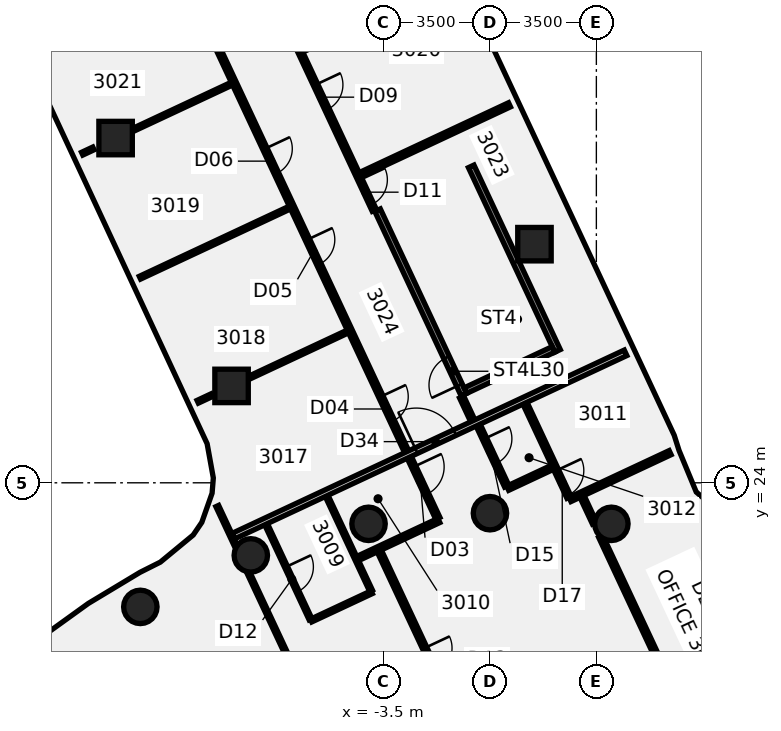
"""IFC4 building model, lengths in metres.
Left out: names, types, materials, properties, quantities, classifications, styles, units other than length and angle.
Written with IfcOpenShell. Run it as: python <this file> out.ifc"""

import sys

from ifc_helpers import new_model, si_unit, direction, frame, frame_2d, origin, origin_2d, place, context, subcontext, project, spatial, polyline, rectangle, circle, outline, extrude, element, fill, save


model = new_model("IFC4")
c1 = context("Model", 3, precision=1e-05, world=origin(), true_north=direction((0.0, 1.0)))
c2 = subcontext(c1, "Body", "Model", "MODEL_VIEW")
j1 = project(units=[si_unit("LENGTHUNIT", "METRE"), si_unit("PLANEANGLEUNIT", "RADIAN")], contexts=[c1])
p1 = place(None, origin())
s1 = spatial("IfcSite", under=j1, at=p1, CompositionType="ELEMENT")
p2 = place(p1, origin())
s2 = spatial("IfcBuilding", under=s1, at=p2, CompositionType="ELEMENT")
p3 = place(p2, frame((0.0, 0.0, 124.75)))
s3 = spatial("IfcBuildingStorey", under=s2, at=p3, CompositionType="ELEMENT", Elevation=124.75)
for number, where, z_axis, x_axis in (
    (1, (3.994, 22.651, -0.14), (0.0, 0.0, 1.0), (1.0, 0.0, 0.0)),
    (2, (0.0, 23.0, -0.14), (0.0, 0.0, 1.0), (1.0, 0.0, 0.0)),
    (3, (-3.994, 22.651, -0.14), (0.0, 0.0, 1.0), (1.0, 0.0, 0.0)),
    (4, (-7.866, 21.613, -0.14), (0.0, 0.0, 1.0), (1.0, 0.0, 0.0)),
    (5, (-11.5, 19.919, -0.14), (0.0, 0.0, 1.0), (1.0, 0.0, 0.0)),
):
    element("IfcColumn", number, at=place(p3, frame(where, z_axis=z_axis, x_axis=x_axis)), inside=s3, PredefinedType="COLUMN", context=c2, shape_type="SweptSolid", body=[
        extrude(circle(Radius=0.55, at=origin_2d()), origin(), (0.0, 0.0, 1.0), 3.71),
    ])
p4 = place(p3, frame((-12.314, 35.338, -0.138), z_axis=(-0.064699855868, -0.060824433029, 0.9960493547), x_axis=(0.903035286049, 0.421197702581, 0.084378714676)))
e6 = element("IfcColumn", 6, at=p4, inside=s3, PredefinedType="COLUMN", context=c2, shape_type="SweptSolid", body=[
    extrude(rectangle(XDim=1.1, YDim=1.1, at=origin_2d()), origin(), (0.0, 0.0, 1.0), 3.717),
])
p5 = place(p3, frame((-8.499, 27.187, -0.139), z_axis=(-0.025080401947, -0.041932325564, 0.998805613476), x_axis=(0.905336041768, 0.422762183328, 0.040481944421)))
e7 = element("IfcColumn", 7, at=p5, inside=s3, PredefinedType="COLUMN", context=c2, shape_type="SweptSolid", body=[
    extrude(rectangle(XDim=1.1, YDim=1.1, at=origin_2d()), origin(), (0.0, 0.0, 1.0), 3.709),
])
p6 = place(p3, frame((1.464, 31.849, -0.139), z_axis=(-0.048386644022, 0.00678071338, 0.998805664084), x_axis=(0.422461295082, -0.905990074096, 0.026616532396)))
e8 = element("IfcColumn", 8, at=p6, inside=s3, PredefinedType="COLUMN", context=c2, shape_type="SweptSolid", body=[
    extrude(rectangle(XDim=1.1, YDim=1.1, at=origin_2d()), origin(), (0.0, 0.0, 1.0), 3.708),
])
p7 = place(p3, frame((-10.294, 41.169, 0.0), z_axis=(0.0, 0.0, 1.0), x_axis=(0.423769207005, -0.905770202201, 0.0)))
e9 = element("IfcWall", 9, at=p7, inside=s3, PredefinedType="PARTITIONING", context=c2, shape_type="SweptSolid", body=[
    extrude(rectangle(XDim=20.246, YDim=0.15, at=frame_2d((10.123, 0.0))), origin(), (0.0, 0.0, 1.0), 2.87),
])
p8 = place(p7, frame((18.375, 0.0, 0.0)))
e10 = element("IfcOpeningElement", 10, at=p8, cuts=e9, PredefinedType="OPENING", context=c2, shape_type="SweptSolid", body=[
    extrude(rectangle(XDim=1.0, YDim=2.1, at=frame_2d((0.5, 1.05))), frame((0.0, 0.085, 0.0), z_axis=(0.0, -1.0, 0.0), x_axis=(1.0, 0.0, 0.0)), (0.0, 0.0, 1.0), 0.17),
])
p9 = place(p7, frame((15.825, 0.0, 0.0)))
e11 = element("IfcOpeningElement", 11, at=p9, cuts=e9, PredefinedType="OPENING", context=c2, shape_type="SweptSolid", body=[
    extrude(rectangle(XDim=0.9, YDim=2.1, at=frame_2d((0.45, 1.05))), frame((0.0, 0.085, 0.0), z_axis=(0.0, -1.0, 0.0), x_axis=(1.0, 0.0, 0.0)), (0.0, 0.0, 1.0), 0.17),
])
p10 = place(p7, frame((10.125, 0.0, 0.0)))
e12 = element("IfcOpeningElement", 12, at=p10, cuts=e9, PredefinedType="OPENING", context=c2, shape_type="SweptSolid", body=[
    extrude(rectangle(XDim=0.9, YDim=2.1, at=frame_2d((0.45, 1.05))), frame((0.0, 0.085, 0.0), z_axis=(0.0, -1.0, 0.0), x_axis=(1.0, 0.0, 0.0)), (0.0, 0.0, 1.0), 0.17),
])
p11 = place(p7, frame((6.825, 0.0, 0.0)))
e13 = element("IfcOpeningElement", 13, at=p11, cuts=e9, PredefinedType="OPENING", context=c2, shape_type="SweptSolid", body=[
    extrude(rectangle(XDim=0.9, YDim=2.1, at=frame_2d((0.45, 1.05))), frame((0.0, 0.085, 0.0), z_axis=(0.0, -1.0, 0.0), x_axis=(1.0, 0.0, 0.0)), (0.0, 0.0, 1.0), 0.17),
])
p12 = place(p7, frame((2.325, 0.0, 0.0)))
e14 = element("IfcOpeningElement", 14, at=p12, cuts=e9, PredefinedType="OPENING", context=c2, shape_type="SweptSolid", body=[
    extrude(rectangle(XDim=0.9, YDim=2.1, at=frame_2d((0.45, 1.05))), frame((0.0, 0.085, 0.0), z_axis=(0.0, -1.0, 0.0), x_axis=(1.0, 0.0, 0.0)), (0.0, 0.0, 1.0), 0.17),
])
p13 = place(p3, frame((-8.969, 23.236, 0.0), z_axis=(0.0, 0.0, 1.0), x_axis=(0.423755205879, -0.905776752567, 0.0)))
e15 = element("IfcWall", 15, at=p13, inside=s3, PredefinedType="PARTITIONING", context=c2, shape_type="SweptSolid", body=[
    extrude(rectangle(XDim=1.475, YDim=0.1, at=frame_2d((0.737, 0.0))), origin(), (0.0, 0.0, 1.0), 2.97),
])
p14 = place(p3, frame((-7.96, 21.078, 0.0), z_axis=(0.0, 0.0, 1.0), x_axis=(0.423844267344, -0.905735081047, 0.0)))
e16 = element("IfcWall", 16, at=p14, inside=s3, PredefinedType="PARTITIONING", context=c2, shape_type="SweptSolid", body=[
    extrude(rectangle(XDim=10.048, YDim=0.1, at=frame_2d((5.024, 0.0))), origin(), (0.0, 0.0, 1.0), 2.97),
])
p15 = place(p3, frame((-8.12, 42.186, 0.0), z_axis=(0.0, 0.0, 1.0), x_axis=(0.423753940866, -0.905777344385, 0.0)))
e17 = element("IfcWall", 17, at=p15, inside=s3, PredefinedType="PARTITIONING", context=c2, shape_type="SweptSolid", body=[
    extrude(rectangle(XDim=10.186, YDim=0.15, at=frame_2d((5.093, 0.0))), origin(), (0.0, 0.0, 1.0), 2.87),
])
p16 = place(p15, frame((5.625, 0.0, 0.0)))
e18 = element("IfcOpeningElement", 18, at=p16, cuts=e17, PredefinedType="OPENING", context=c2, shape_type="SweptSolid", body=[
    extrude(rectangle(XDim=0.9, YDim=2.1, at=frame_2d((0.45, 1.05))), frame((0.0, 0.085, 0.0), z_axis=(0.0, -1.0, 0.0), x_axis=(1.0, 0.0, 0.0)), (0.0, 0.0, 1.0), 0.17),
])
p17 = place(p15, frame((1.275, 0.0, 0.0)))
e19 = element("IfcOpeningElement", 19, at=p17, cuts=e17, PredefinedType="OPENING", context=c2, shape_type="SweptSolid", body=[
    extrude(rectangle(XDim=0.9, YDim=2.1, at=frame_2d((0.45, 1.05))), frame((0.0, 0.085, 0.0), z_axis=(0.0, -1.0, 0.0), x_axis=(1.0, 0.0, 0.0)), (0.0, 0.0, 1.0), 0.17),
])
p18 = place(p15, frame((9.075, 0.0, 0.0)))
e20 = element("IfcOpeningElement", 20, at=p18, cuts=e17, PredefinedType="OPENING", context=c2, shape_type="SweptSolid", body=[
    extrude(rectangle(XDim=0.9, YDim=2.1, at=frame_2d((0.45, 1.05))), frame((0.0, 0.085, 0.0), z_axis=(0.0, -1.0, 0.0), x_axis=(1.0, 0.0, 0.0)), (0.0, 0.0, 1.0), 0.17),
])
p19 = place(p3, frame((-0.931, 26.82, 0.0), z_axis=(0.0, 0.0, 1.0), x_axis=(0.423786528485, -0.905762098056, 0.0)))
e21 = element("IfcWall", 21, at=p19, inside=s3, PredefinedType="PARTITIONING", context=c2, shape_type="SweptSolid", body=[
    extrude(rectangle(XDim=0.86, YDim=0.15, at=frame_2d((0.43, 0.0))), origin(), (0.0, 0.0, 1.0), 2.87),
])
p20 = place(p3, frame((-7.365, 22.638, 0.0), z_axis=(0.0, 0.0, 1.0), x_axis=(0.423671993632, -0.905815677614, 0.0)))
e22 = element("IfcWall", 22, at=p20, inside=s3, PredefinedType="PARTITIONING", context=c2, shape_type="SweptSolid", body=[
    extrude(rectangle(XDim=3.449, YDim=0.1, at=frame_2d((1.724, 0.0))), origin(), (0.0, 0.0, 1.0), 2.87),
])
p21 = place(p20, frame((1.55, 0.0, 0.0)))
e23 = element("IfcOpeningElement", 23, at=p21, cuts=e22, PredefinedType="OPENING", context=c2, shape_type="SweptSolid", body=[
    extrude(rectangle(XDim=0.9, YDim=2.1, at=frame_2d((0.45, 1.05))), frame((0.0, 0.06, 0.0), z_axis=(0.0, -1.0, 0.0), x_axis=(1.0, 0.0, 0.0)), (0.0, 0.0, 1.0), 0.12),
])
p22 = place(p3, frame((-5.371, 23.567, 0.0), z_axis=(0.0, 0.0, 1.0), x_axis=(0.423878271215, -0.90571916795, 0.0)))
e24 = element("IfcWall", 24, at=p22, inside=s3, PredefinedType="PARTITIONING", context=c2, shape_type="SweptSolid", body=[
    extrude(rectangle(XDim=3.446, YDim=0.1, at=frame_2d((1.723, 0.0))), origin(), (0.0, 0.0, 1.0), 2.87),
])
p23 = place(p3, frame((-3.641, 21.759, 0.0), z_axis=(0.0, 0.0, 1.0), x_axis=(0.423809726716, -0.905751243743, 0.0)))
e25 = element("IfcWall", 25, at=p23, inside=s3, PredefinedType="PARTITIONING", context=c2, shape_type="SweptSolid", body=[
    extrude(rectangle(XDim=10.785, YDim=0.15, at=frame_2d((5.393, 0.0))), origin(), (0.0, 0.0, 1.0), 2.97),
])
p24 = place(p23, frame((3.525, 0.0, 0.0)))
e26 = element("IfcOpeningElement", 26, at=p24, cuts=e25, PredefinedType="OPENING", context=c2, shape_type="SweptSolid", body=[
    extrude(rectangle(XDim=0.9, YDim=2.1, at=frame_2d((0.45, 1.05))), frame((0.0, 0.085, 0.0), z_axis=(0.0, -1.0, 0.0), x_axis=(1.0, 0.0, 0.0)), (0.0, 0.0, 1.0), 0.17),
])
p25 = place(p3, frame((-0.388, 25.898, 0.0), z_axis=(0.0, 0.0, 1.0), x_axis=(0.423693860777, -0.905805449498, 0.0)))
e27 = element("IfcWall", 27, at=p25, inside=s3, PredefinedType="PARTITIONING", context=c2, shape_type="SweptSolid", body=[
    extrude(rectangle(XDim=2.215, YDim=0.15, at=frame_2d((1.107, 0.0))), origin(), (0.0, 0.0, 1.0), 2.97),
])
p26 = place(p25, frame((0.495, 0.0, 0.0)))
e28 = element("IfcOpeningElement", 28, at=p26, cuts=e27, PredefinedType="OPENING", context=c2, shape_type="SweptSolid", body=[
    extrude(rectangle(XDim=0.9, YDim=2.1, at=frame_2d((0.45, 1.05))), frame((0.0, 0.085, 0.0), z_axis=(0.0, -1.0, 0.0), x_axis=(1.0, 0.0, 0.0)), (0.0, 0.0, 1.0), 0.17),
])
p27 = place(p3, frame((1.152, 26.618, 0.0), z_axis=(0.0, 0.0, 1.0), x_axis=(0.423667153788, -0.905817941311, 0.0)))
e29 = element("IfcWall", 29, at=p27, inside=s3, PredefinedType="PARTITIONING", context=c2, shape_type="SweptSolid", body=[
    extrude(rectangle(XDim=3.419, YDim=0.15, at=frame_2d((1.709, 0.0))), origin(), (0.0, 0.0, 1.0), 2.97),
])
p28 = place(p27, frame((2.444, 0.0, 0.0)))
e30 = element("IfcOpeningElement", 30, at=p28, cuts=e29, PredefinedType="OPENING", context=c2, shape_type="SweptSolid", body=[
    extrude(rectangle(XDim=0.9, YDim=2.1, at=frame_2d((0.45, 1.05))), frame((0.0, 0.085, 0.0), z_axis=(0.0, -1.0, 0.0), x_axis=(1.0, 0.0, 0.0)), (0.0, 0.0, 1.0), 0.17),
])
p29 = place(p3, frame((3.029, 23.551, 0.0), z_axis=(0.0, 0.0, 1.0), x_axis=(0.423795074158, -0.905758099671, 0.0)))
e31 = element("IfcWall", 31, at=p29, inside=s3, PredefinedType="PARTITIONING", context=c2, shape_type="SweptSolid", body=[
    extrude(rectangle(XDim=0.969, YDim=0.15, at=frame_2d((0.485, 0.0))), origin(), (0.0, 0.0, 1.0), 2.97),
])
p30 = place(p3, frame((3.644, 22.235, 0.0), z_axis=(0.0, 0.0, 1.0), x_axis=(0.423784513988, -0.905763040593, 0.0)))
e32 = element("IfcWall", 32, at=p30, inside=s3, PredefinedType="PARTITIONING", context=c2, shape_type="SweptSolid", body=[
    extrude(rectangle(XDim=11.311, YDim=0.15, at=frame_2d((5.655, 0.0))), origin(), (0.0, 0.0, 1.0), 2.97),
])
p31 = place(p30, frame((6.75, 0.0, 0.0)))
e33 = element("IfcOpeningElement", 33, at=p31, cuts=e32, PredefinedType="OPENING", context=c2, shape_type="SweptSolid", body=[
    extrude(rectangle(XDim=0.9, YDim=2.1, at=frame_2d((0.45, 1.05))), frame((0.0, 0.085, 0.0), z_axis=(0.0, -1.0, 0.0), x_axis=(1.0, 0.0, 0.0)), (0.0, 0.0, 1.0), 0.17),
])
p32 = place(p3, frame((-13.413, 34.825, 0.0), z_axis=(0.0, 0.0, 1.0), x_axis=(0.905846575119, 0.423605928127, 0.0)))
e34 = element("IfcWall", 34, at=p32, inside=s3, PredefinedType="PARTITIONING", context=c2, shape_type="SweptSolid", body=[
    extrude(rectangle(XDim=0.408, YDim=0.1, at=frame_2d((0.204, 0.0))), origin(), (0.0, 0.0, 1.0), 2.97),
])
p33 = place(p3, frame((-11.852, 35.555, 0.0), z_axis=(0.0, 0.0, 1.0), x_axis=(0.905779849786, 0.423748585511, 0.0)))
e35 = element("IfcWall", 35, at=p33, inside=s3, PredefinedType="PARTITIONING", context=c2, shape_type="SweptSolid", body=[
    extrude(rectangle(XDim=3.716, YDim=0.1, at=frame_2d((1.858, 0.0))), origin(), (0.0, 0.0, 1.0), 2.87),
])
p34 = place(p3, frame((-11.513, 30.745, 0.0), z_axis=(0.0, 0.0, 1.0), x_axis=(0.905786512013, 0.423734344438, 0.0)))
e36 = element("IfcWall", 36, at=p34, inside=s3, PredefinedType="PARTITIONING", context=c2, shape_type="SweptSolid", body=[
    extrude(rectangle(XDim=5.447, YDim=0.1, at=frame_2d((2.723, 0.0))), origin(), (0.0, 0.0, 1.0), 2.87),
])
p35 = place(p3, frame((-4.27, 34.134, 0.0), z_axis=(0.0, 0.0, 1.0), x_axis=(0.905772206223, 0.423764923553, 0.0)))
e37 = element("IfcWall", 37, at=p35, inside=s3, PredefinedType="PARTITIONING", context=c2, shape_type="SweptSolid", body=[
    extrude(rectangle(XDim=5.424, YDim=0.15, at=frame_2d((2.712, 0.0))), origin(), (0.0, 0.0, 1.0), 2.87),
])
p36 = place(p3, frame((-9.613, 26.666, 0.0), z_axis=(0.0, 0.0, 1.0), x_axis=(0.905887159872, 0.423519130121, 0.0)))
e38 = element("IfcWall", 38, at=p36, inside=s3, PredefinedType="PARTITIONING", context=c2, shape_type="SweptSolid", body=[
    extrude(rectangle(XDim=0.506, YDim=0.1, at=frame_2d((0.253, 0.0))), origin(), (0.0, 0.0, 1.0), 2.97),
])
p37 = place(p3, frame((-7.964, 27.437, 0.0), z_axis=(0.0, 0.0, 1.0), x_axis=(0.905736329332, 0.423841599809, 0.0)))
e39 = element("IfcWall", 39, at=p37, inside=s3, PredefinedType="PARTITIONING", context=c2, shape_type="SweptSolid", body=[
    extrude(rectangle(XDim=3.634, YDim=0.1, at=frame_2d((1.817, 0.0))), origin(), (0.0, 0.0, 1.0), 2.97),
])
p38 = place(p3, frame((-8.44, 22.246, 0.0), z_axis=(0.0, 0.0, 1.0), x_axis=(0.905948211467, 0.423388519139, 0.0)))
e40 = element("IfcWall", 40, at=p38, inside=s3, PredefinedType="PARTITIONING", context=c2, shape_type="SweptSolid", body=[
    extrude(rectangle(XDim=14.239, YDim=0.2, at=frame_2d((7.119, 0.0))), origin(), (0.0, 0.0, 1.0), 2.87),
])
p39 = place(p38, frame((6.64, 0.0, 0.0)))
e41 = element("IfcOpeningElement", 41, at=p39, cuts=e40, PredefinedType="OPENING", context=c2, shape_type="SweptSolid", body=[
    extrude(rectangle(XDim=1.4, YDim=2.1, at=frame_2d((0.7, 1.05))), frame((0.0, 0.11, 0.0), z_axis=(0.0, -1.0, 0.0), x_axis=(1.0, 0.0, 0.0)), (0.0, 0.0, 1.0), 0.22),
])
p40 = place(p3, frame((-5.882, 19.469, 0.0), z_axis=(0.0, 0.0, 1.0), x_axis=(0.905879588514, 0.423535324517, 0.0)))
e42 = element("IfcWall", 42, at=p40, inside=s3, PredefinedType="PARTITIONING", context=c2, shape_type="SweptSolid", body=[
    extrude(rectangle(XDim=2.2, YDim=0.1, at=frame_2d((1.1, 0.0))), origin(), (0.0, 0.0, 1.0), 2.97),
])
p41 = place(p3, frame((2.633, 23.451, 0.0), z_axis=(0.0, 0.0, 1.0), x_axis=(0.905831155587, 0.42363889997, 0.0)))
e43 = element("IfcWall", 43, at=p41, inside=s3, PredefinedType="PARTITIONING", context=c2, shape_type="SweptSolid", body=[
    extrude(rectangle(XDim=3.636, YDim=0.15, at=frame_2d((1.818, 0.0))), origin(), (0.0, 0.0, 1.0), 2.97),
])
p42 = place(p3, frame((-4.352, 21.509, 0.0), z_axis=(0.0, 0.0, 1.0), x_axis=(0.905651681577, 0.424022442398, 0.0)))
e44 = element("IfcWall", 44, at=p42, inside=s3, PredefinedType="PARTITIONING", context=c2, shape_type="SweptSolid", body=[
    extrude(rectangle(XDim=2.95, YDim=0.15, at=frame_2d((1.475, 0.0))), origin(), (0.0, 0.0, 1.0), 2.87),
])
p43 = place(p3, frame((0.583, 23.82, 0.0), z_axis=(0.0, 0.0, 1.0), x_axis=(0.905668132329, 0.423987304153, 0.0)))
e45 = element("IfcWall", 45, at=p43, inside=s3, PredefinedType="PARTITIONING", context=c2, shape_type="SweptSolid", body=[
    extrude(rectangle(XDim=1.625, YDim=0.15, at=frame_2d((0.812, 0.0))), origin(), (0.0, 0.0, 1.0), 2.97),
])
p44 = place(p3, frame((-0.857, 26.899, -0.14), z_axis=(0.0, 0.0, 1.0), x_axis=(-0.423828808535, 0.90574231493, 0.0)))
e46 = element("IfcWall", 46, at=p44, inside=s3, PredefinedType="SHEAR", context=c2, shape_type="SweptSolid", body=[
    extrude(rectangle(XDim=6.7, YDim=0.2, at=frame_2d((3.35, 0.0))), origin(), (0.0, 0.0, 1.0), 3.01),
])
p45 = place(p44, frame((0.35, 0.0, 0.0)))
e47 = element("IfcOpeningElement", 47, at=p45, cuts=e46, PredefinedType="OPENING", context=c2, shape_type="SweptSolid", body=[
    extrude(rectangle(XDim=1.0, YDim=2.1, at=frame_2d((0.5, 1.05))), frame((0.0, 0.11, 0.0), z_axis=(0.0, -1.0, 0.0), x_axis=(1.0, 0.0, 0.0)), (0.0, 0.0, 1.0), 0.22),
])
p46 = place(p3, frame((2.223, 28.34, -0.14), z_axis=(0.0, 0.0, 1.0), x_axis=(-0.423828808535, 0.90574231493, 0.0)))
e48 = element("IfcWall", 48, at=p46, inside=s3, PredefinedType="SHEAR", context=c2, shape_type="SweptSolid", body=[
    extrude(rectangle(XDim=6.7, YDim=0.2, at=frame_2d((3.35, 0.0))), origin(), (0.0, 0.0, 1.0), 3.01),
])
p47 = place(p3, frame((2.09, 28.388, -0.14), z_axis=(0.0, 0.0, 1.0), x_axis=(-0.905751920053, -0.423808281325, 0.0)))
e49 = element("IfcWall", 49, at=p47, inside=s3, PredefinedType="SHEAR", context=c2, shape_type="SweptSolid", body=[
    extrude(rectangle(XDim=3.2, YDim=0.2, at=frame_2d((1.6, 0.0))), origin(), (0.0, 0.0, 1.0), 3.01),
])
p48 = place(p3, frame((0.0, 0.0, -0.14)))
e50 = element("IfcWall", 50, at=p48, inside=s3, PredefinedType="SHEAR", context=c2, shape_type="SweptSolid", body=[
    extrude(outline(polyline([(-0.623, 34.185), (-0.707, 34.366), (-3.606, 33.01), (-3.521, 32.828), (-0.623, 34.185)])), origin(), (0.0, 0.0, 1.0), 3.01),
])
p49 = place(p8, frame((1.0, 0.0, 0.0), z_axis=(0.0, 0.0, 1.0), x_axis=(-1.0, 0.0, 0.0)))
e51 = element("IfcDoor", 51, at=p49, inside=s3, OperationType="SINGLE_SWING_RIGHT", PredefinedType="DOOR", context=c2, shape_type="SweptSolid", body=[
    extrude(rectangle(XDim=1.0, YDim=2.1, at=frame_2d((0.5, 1.05))), frame((0.0, 0.025, 0.0), z_axis=(0.0, -1.0, 0.0), x_axis=(1.0, 0.0, 0.0)), (0.0, 0.0, 1.0), 0.05),
])
fill(e10, e51)
p50 = place(p9, frame((0.9, 0.0, 0.0), z_axis=(0.0, 0.0, 1.0), x_axis=(-1.0, 0.0, 0.0)))
e52 = element("IfcDoor", 52, at=p50, inside=s3, OperationType="SINGLE_SWING_RIGHT", PredefinedType="DOOR", context=c2, shape_type="SweptSolid", body=[
    extrude(rectangle(XDim=0.9, YDim=2.1, at=frame_2d((0.45, 1.05))), frame((0.0, 0.025, 0.0), z_axis=(0.0, -1.0, 0.0), x_axis=(1.0, 0.0, 0.0)), (0.0, 0.0, 1.0), 0.05),
])
fill(e11, e52)
p51 = place(p10, frame((0.9, 0.0, 0.0), z_axis=(0.0, 0.0, 1.0), x_axis=(-1.0, 0.0, 0.0)))
e53 = element("IfcDoor", 53, at=p51, inside=s3, OperationType="SINGLE_SWING_RIGHT", PredefinedType="DOOR", context=c2, shape_type="SweptSolid", body=[
    extrude(rectangle(XDim=0.9, YDim=2.1, at=frame_2d((0.45, 1.05))), frame((0.0, 0.025, 0.0), z_axis=(0.0, -1.0, 0.0), x_axis=(1.0, 0.0, 0.0)), (0.0, 0.0, 1.0), 0.05),
])
fill(e12, e53)
p52 = place(p11, frame((0.9, 0.0, 0.0), z_axis=(0.0, 0.0, 1.0), x_axis=(-1.0, 0.0, 0.0)))
e54 = element("IfcDoor", 54, at=p52, inside=s3, OperationType="SINGLE_SWING_LEFT", PredefinedType="DOOR", context=c2, shape_type="SweptSolid", body=[
    extrude(rectangle(XDim=0.9, YDim=2.1, at=frame_2d((0.45, 1.05))), frame((0.0, 0.025, 0.0), z_axis=(0.0, -1.0, 0.0), x_axis=(1.0, 0.0, 0.0)), (0.0, 0.0, 1.0), 0.05),
])
fill(e13, e54)
p53 = place(p16, origin())
e55 = element("IfcDoor", 55, at=p53, inside=s3, OperationType="SINGLE_SWING_LEFT", PredefinedType="DOOR", context=c2, shape_type="SweptSolid", body=[
    extrude(rectangle(XDim=0.9, YDim=2.1, at=frame_2d((0.45, 1.05))), frame((0.0, 0.025, 0.0), z_axis=(0.0, -1.0, 0.0), x_axis=(1.0, 0.0, 0.0)), (0.0, 0.0, 1.0), 0.05),
])
fill(e18, e55)
p54 = place(p18, origin())
e56 = element("IfcDoor", 56, at=p54, inside=s3, OperationType="SINGLE_SWING_LEFT", PredefinedType="DOOR", context=c2, shape_type="SweptSolid", body=[
    extrude(rectangle(XDim=0.9, YDim=2.1, at=frame_2d((0.45, 1.05))), frame((0.0, 0.025, 0.0), z_axis=(0.0, -1.0, 0.0), x_axis=(1.0, 0.0, 0.0)), (0.0, 0.0, 1.0), 0.05),
])
fill(e20, e56)
p55 = place(p21, origin())
e57 = element("IfcDoor", 57, at=p55, inside=s3, OperationType="SINGLE_SWING_LEFT", PredefinedType="DOOR", context=c2, shape_type="SweptSolid", body=[
    extrude(rectangle(XDim=0.9, YDim=2.1, at=frame_2d((0.45, 1.05))), frame((0.0, 0.025, 0.0), z_axis=(0.0, -1.0, 0.0), x_axis=(1.0, 0.0, 0.0)), (0.0, 0.0, 1.0), 0.05),
])
fill(e23, e57)
p56 = place(p24, frame((0.9, 0.0, 0.0), z_axis=(0.0, 0.0, 1.0), x_axis=(-1.0, 0.0, 0.0)))
e58 = element("IfcDoor", 58, at=p56, inside=s3, OperationType="SINGLE_SWING_LEFT", PredefinedType="DOOR", context=c2, shape_type="SweptSolid", body=[
    extrude(rectangle(XDim=0.9, YDim=2.1, at=frame_2d((0.45, 1.05))), frame((0.0, 0.025, 0.0), z_axis=(0.0, -1.0, 0.0), x_axis=(1.0, 0.0, 0.0)), (0.0, 0.0, 1.0), 0.05),
])
fill(e26, e58)
p57 = place(p26, origin())
e59 = element("IfcDoor", 59, at=p57, inside=s3, OperationType="SINGLE_SWING_RIGHT", PredefinedType="DOOR", context=c2, shape_type="SweptSolid", body=[
    extrude(rectangle(XDim=0.9, YDim=2.1, at=frame_2d((0.45, 1.05))), frame((0.0, 0.025, 0.0), z_axis=(0.0, -1.0, 0.0), x_axis=(1.0, 0.0, 0.0)), (0.0, 0.0, 1.0), 0.05),
])
fill(e28, e59)
p58 = place(p28, origin())
e60 = element("IfcDoor", 60, at=p58, inside=s3, OperationType="SINGLE_SWING_LEFT", PredefinedType="DOOR", context=c2, shape_type="SweptSolid", body=[
    extrude(rectangle(XDim=0.9, YDim=2.1, at=frame_2d((0.45, 1.05))), frame((0.0, 0.025, 0.0), z_axis=(0.0, -1.0, 0.0), x_axis=(1.0, 0.0, 0.0)), (0.0, 0.0, 1.0), 0.05),
])
fill(e30, e60)
p59 = place(p39, frame((1.4, 0.0, 0.0), z_axis=(0.0, 0.0, 1.0), x_axis=(-1.0, 0.0, 0.0)))
e61 = element("IfcDoor", 61, at=p59, inside=s3, OperationType="DOUBLE_DOOR_SINGLE_SWING", PredefinedType="DOOR", context=c2, shape_type="SweptSolid", body=[
    extrude(rectangle(XDim=1.4, YDim=2.1, at=frame_2d((0.7, 1.05))), frame((0.0, 0.025, 0.0), z_axis=(0.0, -1.0, 0.0), x_axis=(1.0, 0.0, 0.0)), (0.0, 0.0, 1.0), 0.05),
])
fill(e41, e61)
p60 = place(p45, origin())
e62 = element("IfcDoor", 62, at=p60, inside=s3, OperationType="SINGLE_SWING_LEFT", PredefinedType="DOOR", context=c2, shape_type="SweptSolid", body=[
    extrude(rectangle(XDim=1.0, YDim=2.1, at=frame_2d((0.5, 1.05))), frame((0.0, 0.025, 0.0), z_axis=(0.0, -1.0, 0.0), x_axis=(1.0, 0.0, 0.0)), (0.0, 0.0, 1.0), 0.05),
])
fill(e47, e62)
save(model, sys.argv[1])
